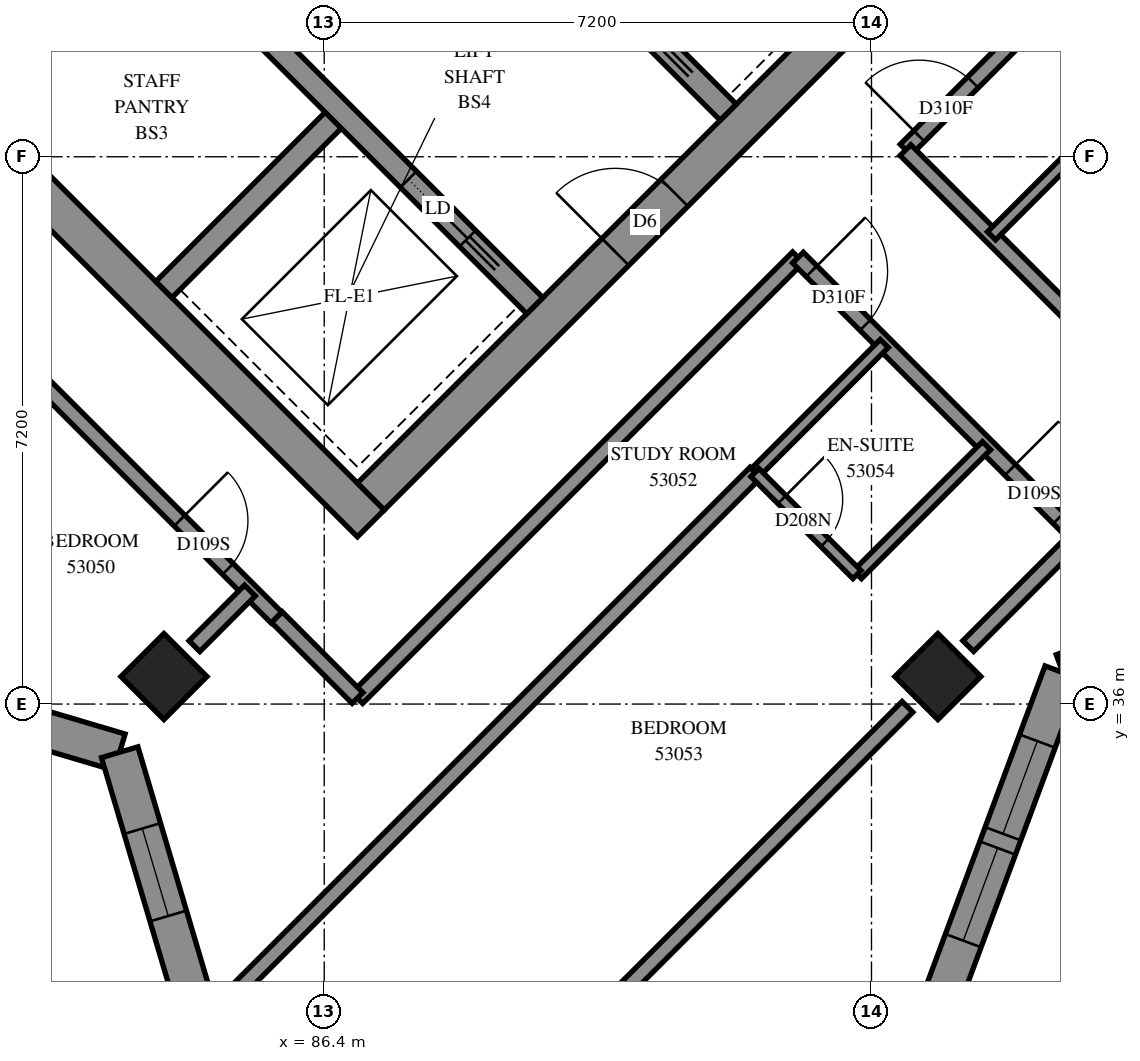
"""IFC4 building model, lengths in metres.
Left out: names, types, materials, properties, quantities, classifications, styles, units other than length and angle.
Written with IfcOpenShell. Run it as: python <this file> out.ifc"""

import sys

from ifc_helpers import new_model, si_unit, direction, frame, frame_2d, origin, origin_2d, place, context, subcontext, project, spatial, polyline, rectangle, outline, extrude, element, fill, save


model = new_model("IFC4")
c1 = context("Model", 3, precision=1e-05, world=origin(), true_north=direction((0.0, 1.0)))
c2 = subcontext(c1, "Body", "Model", "MODEL_VIEW")
j1 = project(units=[si_unit("LENGTHUNIT", "METRE"), si_unit("PLANEANGLEUNIT", "RADIAN")], contexts=[c1])
p1 = place(None, origin())
s1 = spatial("IfcSite", under=j1, at=p1, CompositionType="ELEMENT")
p2 = place(p1, origin())
s2 = spatial("IfcBuilding", under=s1, at=p2, CompositionType="ELEMENT")
p3 = place(p2, frame((0.0, 0.0, 196.4)))
s3 = spatial("IfcBuildingStorey", under=s2, at=p3, CompositionType="ELEMENT", Elevation=196.4)
for number, where, z_axis, x_axis in (
    (1, (84.291, 36.362, 0.0), (0.0, 0.0, 1.0), (0.707, -0.707, 0.0)),
    (2, (94.474, 36.362, 0.0), (0.0, 0.0, 1.0), (0.707, -0.707, 0.0)),
):
    element("IfcColumn", number, at=place(p3, frame(where, z_axis=z_axis, x_axis=x_axis)), inside=s3, PredefinedType="COLUMN", context=c2, shape_type="SweptSolid", body=[
        extrude(rectangle(XDim=0.8, YDim=0.8, at=origin_2d()), origin(), (0.0, 0.0, 1.0), 3.1),
    ])
p4 = place(p3, frame((76.124, 49.267, -0.3), z_axis=(0.0, 0.0, 1.0), x_axis=(0.7071067812, -0.7071067812, 0.0)))
e3 = element("IfcWall", 3, at=p4, inside=s3, PredefinedType="SHEAR", context=c2, shape_type="SweptSolid", body=[
    extrude(rectangle(XDim=15.4, YDim=0.5, at=frame_2d((7.7, 0.0))), origin(), (0.0, 0.0, 1.0), 2.7),
])
p5 = place(p3, frame((87.013, 38.731, -0.3), z_axis=(0.0, 0.0, 1.0), x_axis=(0.7071067812, 0.7071067812, 0.0)))
e4 = element("IfcWall", 4, at=p5, inside=s3, PredefinedType="SHEAR", context=c2, shape_type="SweptSolid", body=[
    extrude(rectangle(XDim=14.4, YDim=0.5, at=frame_2d((7.2, 0.0))), origin(), (0.0, 0.0, 1.0), 2.7),
])
p6 = place(p5, frame((4.55, 0.0, 0.3)))
e5 = element("IfcOpeningElement", 5, at=p6, cuts=e4, PredefinedType="OPENING", context=c2, shape_type="SweptSolid", body=[
    extrude(rectangle(XDim=1.1, YDim=2.1, at=frame_2d((0.55, 1.05))), frame((0.0, 0.26, 0.0), z_axis=(0.0, -1.0, 0.0), x_axis=(1.0, 0.0, 0.0)), (0.0, 0.0, 1.0), 0.52),
])
p7 = place(p5, frame((11.35, 0.0, 0.3)))
e6 = element("IfcOpeningElement", 6, at=p7, cuts=e4, PredefinedType="OPENING", context=c2, shape_type="SweptSolid", body=[
    extrude(rectangle(XDim=1.1, YDim=2.1, at=frame_2d((0.55, 1.05))), frame((0.0, 0.26, 0.0), z_axis=(0.0, -1.0, 0.0), x_axis=(1.0, 0.0, 0.0)), (0.0, 0.0, 1.0), 0.52),
])
for number, where, z_axis, x_axis in (
    (7, (81.746, 43.999, 0.0), (0.0, 0.0, 1.0), (0.707, 0.707, 0.0)),
    (8, (84.291, 41.453, 0.0), (0.0, 0.0, 1.0), (0.707, 0.707, 0.0)),
):
    element("IfcWall", number, at=place(p3, frame(where, z_axis=z_axis, x_axis=x_axis)), inside=s3, PredefinedType="SOLIDWALL", context=c2, shape_type="SweptSolid", body=[
        extrude(rectangle(XDim=3.3, YDim=0.3, at=frame_2d((1.65, 0.0))), origin(), (0.0, 0.0, 1.0), 3.1),
    ])
p8 = place(p3, frame((78.988, 51.423, 0.0), z_axis=(0.0, 0.0, 1.0), x_axis=(0.7071067812, -0.7071067812, 0.0)))
e9 = element("IfcWall", 9, at=p8, inside=s3, PredefinedType="SOLIDWALL", context=c2, shape_type="SweptSolid", body=[
    extrude(rectangle(XDim=14.4, YDim=0.3, at=frame_2d((7.2, 0.0))), origin(), (0.0, 0.0, 1.0), 3.1),
])
p9 = place(p8, frame((1.35, 0.0, 0.0)))
e10 = element("IfcOpeningElement", 10, at=p9, cuts=e9, PredefinedType="OPENING", context=c2, shape_type="SweptSolid", body=[
    extrude(rectangle(XDim=0.9, YDim=2.1, at=frame_2d((0.45, 1.05))), frame((0.0, 0.16, 0.0), z_axis=(0.0, -1.0, 0.0), x_axis=(1.0, 0.0, 0.0)), (0.0, 0.0, 1.0), 0.32),
])
p10 = place(p8, frame((4.95, 0.0, 0.0)))
e11 = element("IfcOpeningElement", 11, at=p10, cuts=e9, PredefinedType="OPENING", context=c2, shape_type="SweptSolid", body=[
    extrude(rectangle(XDim=0.9, YDim=2.1, at=frame_2d((0.45, 1.05))), frame((0.0, 0.16, 0.0), z_axis=(0.0, -1.0, 0.0), x_axis=(1.0, 0.0, 0.0)), (0.0, 0.0, 1.0), 0.32),
])
p11 = place(p8, frame((8.55, 0.0, 0.0)))
e12 = element("IfcOpeningElement", 12, at=p11, cuts=e9, PredefinedType="OPENING", context=c2, shape_type="SweptSolid", body=[
    extrude(rectangle(XDim=0.9, YDim=2.1, at=frame_2d((0.45, 1.05))), frame((0.0, 0.16, 0.0), z_axis=(0.0, -1.0, 0.0), x_axis=(1.0, 0.0, 0.0)), (0.0, 0.0, 1.0), 0.32),
])
p12 = place(p8, frame((12.05, 0.0, 0.0)))
e13 = element("IfcOpeningElement", 13, at=p12, cuts=e9, PredefinedType="OPENING", context=c2, shape_type="SweptSolid", body=[
    extrude(rectangle(XDim=1.1, YDim=2.1, at=frame_2d((0.55, 1.05))), frame((0.0, 0.16, 0.0), z_axis=(0.0, -1.0, 0.0), x_axis=(1.0, 0.0, 0.0)), (0.0, 0.0, 1.0), 0.32),
])
p13 = place(p3, frame((81.534, 53.969, 0.0), z_axis=(0.0, 0.0, 1.0), x_axis=(0.707103309, -0.7071102534, 0.0)))
e14 = element("IfcWall", 14, at=p13, inside=s3, PredefinedType="SOLIDWALL", context=c2, shape_type="SweptSolid", body=[
    extrude(rectangle(XDim=14.4, YDim=0.3, at=frame_2d((7.2, 0.0))), origin(), (0.0, 0.0, 1.0), 3.1),
])
p14 = place(p13, frame((1.25, 0.0, 0.0)))
e15 = element("IfcOpeningElement", 15, at=p14, cuts=e14, PredefinedType="OPENING", context=c2, shape_type="SweptSolid", body=[
    extrude(rectangle(XDim=1.1, YDim=2.1, at=frame_2d((0.55, 1.05))), frame((0.0, 0.16, 0.0), z_axis=(0.0, -1.0, 0.0), x_axis=(1.0, 0.0, 0.0)), (0.0, 0.0, 1.0), 0.32),
])
p15 = place(p13, frame((4.85, 0.0, 0.0)))
e16 = element("IfcOpeningElement", 16, at=p15, cuts=e14, PredefinedType="OPENING", context=c2, shape_type="SweptSolid", body=[
    extrude(rectangle(XDim=1.1, YDim=2.1, at=frame_2d((0.55, 1.05))), frame((0.0, 0.16, 0.0), z_axis=(0.0, -1.0, 0.0), x_axis=(1.0, 0.0, 0.0)), (0.0, 0.0, 1.0), 0.32),
])
p16 = place(p13, frame((8.45, 0.0, 0.0)))
e17 = element("IfcOpeningElement", 17, at=p16, cuts=e14, PredefinedType="OPENING", context=c2, shape_type="SweptSolid", body=[
    extrude(rectangle(XDim=1.1, YDim=2.1, at=frame_2d((0.55, 1.05))), frame((0.0, 0.16, 0.0), z_axis=(0.0, -1.0, 0.0), x_axis=(1.0, 0.0, 0.0)), (0.0, 0.0, 1.0), 0.32),
])
p17 = place(p13, frame((12.05, 0.0, 0.0)))
e18 = element("IfcOpeningElement", 18, at=p17, cuts=e14, PredefinedType="OPENING", context=c2, shape_type="SweptSolid", body=[
    extrude(rectangle(XDim=1.1, YDim=2.1, at=frame_2d((0.55, 1.05))), frame((0.0, 0.16, 0.0), z_axis=(0.0, -1.0, 0.0), x_axis=(1.0, 0.0, 0.0)), (0.0, 0.0, 1.0), 0.32),
])
p18 = place(p3, frame((94.281, 31.47, 0.0), z_axis=(0.0, 0.0, 1.0), x_axis=(0.3481903374, 0.9374238577, 0.0)))
e19 = element("IfcWall", 19, at=p18, inside=s3, PredefinedType="SOLIDWALL", context=c2, shape_type="SweptSolid", body=[
    extrude(outline(polyline([(-0.12, -0.25), (5.16, -0.25), (5.39, 0.25), (0.12, 0.25), (-0.12, -0.25)])), origin(), (0.0, 0.0, 1.0), 3.1),
])
p19 = place(p18, frame((1.512, 0.0, 0.45)))
e20 = element("IfcOpeningElement", 20, at=p19, cuts=e19, PredefinedType="OPENING", context=c2, shape_type="SweptSolid", body=[
    extrude(rectangle(XDim=1.3, YDim=2.5, at=frame_2d((0.65, 1.25))), frame((0.0, 0.26, 0.0), z_axis=(0.0, -1.0, 0.0), x_axis=(1.0, 0.0, 0.0)), (0.0, 0.0, 1.0), 0.52),
])
p20 = place(p18, frame((3.012, 0.0, 0.45)))
e21 = element("IfcOpeningElement", 21, at=p20, cuts=e19, PredefinedType="OPENING", context=c2, shape_type="SweptSolid", body=[
    extrude(rectangle(XDim=1.3, YDim=2.5, at=frame_2d((0.65, 1.25))), frame((0.0, 0.26, 0.0), z_axis=(0.0, -1.0, 0.0), x_axis=(1.0, 0.0, 0.0)), (0.0, 0.0, 1.0), 0.52),
])
p21 = place(p3, frame((96.118, 36.415, 0.0), z_axis=(0.0, 0.0, 1.0), x_axis=(0.9374238577, 0.3481903374, 0.0)))
e22 = element("IfcWall", 22, at=p21, inside=s3, PredefinedType="SOLIDWALL", context=c2, shape_type="SweptSolid", body=[
    extrude(outline(polyline([(0.115, -0.25), (5.395, -0.25), (5.155, 0.25), (-0.115, 0.25), (0.115, -0.25)])), origin(), (0.0, 0.0, 1.0), 3.1),
])
p22 = place(p21, frame((1.655, 0.0, 0.45)))
e23 = element("IfcOpeningElement", 23, at=p22, cuts=e22, PredefinedType="OPENING", context=c2, shape_type="SweptSolid", body=[
    extrude(rectangle(XDim=1.3, YDim=2.5, at=frame_2d((0.65, 1.25))), frame((0.0, 0.26, 0.0), z_axis=(0.0, -1.0, 0.0), x_axis=(1.0, 0.0, 0.0)), (0.0, 0.0, 1.0), 0.52),
])
p23 = place(p21, frame((3.155, 0.0, 0.45)))
e24 = element("IfcOpeningElement", 24, at=p23, cuts=e22, PredefinedType="OPENING", context=c2, shape_type="SweptSolid", body=[
    extrude(rectangle(XDim=1.3, YDim=2.5, at=frame_2d((0.65, 1.25))), frame((0.0, 0.26, 0.0), z_axis=(0.0, -1.0, 0.0), x_axis=(1.0, 0.0, 0.0)), (0.0, 0.0, 1.0), 0.52),
])
p24 = place(p3, frame((79.293, 36.675, 0.0), z_axis=(0.0, 0.0, 1.0), x_axis=(0.9587670056, -0.2841932951, 0.0)))
e25 = element("IfcWall", 25, at=p24, inside=s3, PredefinedType="SOLIDWALL", context=c2, shape_type="SweptSolid", body=[
    extrude(outline(polyline([(-0.142, -0.25), (4.47, -0.25), (4.742, 0.25), (0.142, 0.25), (-0.142, -0.25)])), origin(), (0.0, 0.0, 1.0), 3.1),
])
p25 = place(p24, frame((0.6, 0.0, 0.45)))
e26 = element("IfcOpeningElement", 26, at=p25, cuts=e25, PredefinedType="OPENING", context=c2, shape_type="SweptSolid", body=[
    extrude(rectangle(XDim=1.3, YDim=2.5, at=frame_2d((0.65, 1.25))), frame((0.0, 0.26, 0.0), z_axis=(0.0, -1.0, 0.0), x_axis=(1.0, 0.0, 0.0)), (0.0, 0.0, 1.0), 0.52),
])
p26 = place(p24, frame((2.3, 0.0, 0.45)))
e27 = element("IfcOpeningElement", 27, at=p26, cuts=e25, PredefinedType="OPENING", context=c2, shape_type="SweptSolid", body=[
    extrude(rectangle(XDim=1.3, YDim=2.5, at=frame_2d((0.65, 1.25))), frame((0.0, 0.26, 0.0), z_axis=(0.0, -1.0, 0.0), x_axis=(1.0, 0.0, 0.0)), (0.0, 0.0, 1.0), 0.52),
])
p27 = place(p3, frame((83.709, 35.366, 0.0), z_axis=(0.0, 0.0, 1.0), x_axis=(0.2841932951, -0.9587670056, 0.0)))
e28 = element("IfcWall", 28, at=p27, inside=s3, PredefinedType="SOLIDWALL", context=c2, shape_type="SweptSolid", body=[
    extrude(outline(polyline([(0.136, -0.25), (4.748, -0.25), (4.464, 0.25), (-0.136, 0.25), (0.136, -0.25)])), origin(), (0.0, 0.0, 1.0), 3.1),
])
p28 = place(p27, frame((1.047, 0.0, 0.45)))
e29 = element("IfcOpeningElement", 29, at=p28, cuts=e28, PredefinedType="OPENING", context=c2, shape_type="SweptSolid", body=[
    extrude(rectangle(XDim=1.2, YDim=2.5, at=frame_2d((0.6, 1.25))), frame((0.0, 0.26, 0.0), z_axis=(0.0, -1.0, 0.0), x_axis=(1.0, 0.0, 0.0)), (0.0, 0.0, 1.0), 0.52),
])
p29 = place(p3, frame((84.981, 31.956, 0.0), z_axis=(0.0, 0.0, 1.0), x_axis=(0.7072314232, 0.7069821172, 0.0)))
e30 = element("IfcWall", 30, at=p29, inside=s3, PredefinedType="PARTITIONING", context=c2, shape_type="SweptSolid", body=[
    extrude(rectangle(XDim=10.028, YDim=0.2, at=frame_2d((5.014, 0.0))), origin(), (0.0, 0.0, 1.0), 3.1),
])
p30 = place(p3, frame((94.049, 43.293, 0.0), z_axis=(0.0, 0.0, 1.0), x_axis=(0.7071067812, 0.7071067812, 0.0)))
e31 = element("IfcWall", 31, at=p30, inside=s3, PredefinedType="PARTITIONING", context=c2, shape_type="SweptSolid", body=[
    extrude(rectangle(XDim=8.2, YDim=0.2, at=frame_2d((4.1, 0.0))), origin(), (0.0, 0.0, 1.0), 3.1),
])
p31 = place(p30, frame((0.252, 0.0, 0.0)))
e32 = element("IfcOpeningElement", 32, at=p31, cuts=e31, PredefinedType="OPENING", context=c2, shape_type="SweptSolid", body=[
    extrude(rectangle(XDim=1.0, YDim=2.1, at=frame_2d((0.5, 1.05))), frame((0.0, 0.11, 0.0), z_axis=(0.0, -1.0, 0.0), x_axis=(1.0, 0.0, 0.0)), (0.0, 0.0, 1.0), 0.22),
])
p32 = place(p3, frame((86.835, 36.079, 0.0), z_axis=(0.0, 0.0, 1.0), x_axis=(0.7071067812, 0.7071067812, 0.0)))
e33 = element("IfcWall", 33, at=p32, inside=s3, PredefinedType="PARTITIONING", context=c2, shape_type="SweptSolid", body=[
    extrude(rectangle(XDim=8.2, YDim=0.2, at=frame_2d((4.1, 0.0))), origin(), (0.0, 0.0, 1.0), 3.1),
])
p33 = place(p3, frame((80.849, 42.061, 0.0), z_axis=(0.0, 0.0, 1.0), x_axis=(0.7071067812, -0.7071067812, 0.0)))
e34 = element("IfcWall", 34, at=p33, inside=s3, PredefinedType="PARTITIONING", context=c2, shape_type="SweptSolid", body=[
    extrude(rectangle(XDim=6.964, YDim=0.2, at=frame_2d((3.482, 0.0))), origin(), (0.0, 0.0, 1.0), 3.1),
])
p34 = place(p33, frame((5.159, 0.0, 0.0)))
e35 = element("IfcOpeningElement", 35, at=p34, cuts=e34, PredefinedType="OPENING", context=c2, shape_type="SweptSolid", body=[
    extrude(rectangle(XDim=0.9, YDim=2.1, at=frame_2d((0.45, 1.05))), frame((0.0, 0.11, 0.0), z_axis=(0.0, -1.0, 0.0), x_axis=(1.0, 0.0, 0.0)), (0.0, 0.0, 1.0), 0.22),
])
p35 = place(p3, frame((89.781, 31.671, 0.0), z_axis=(0.0, 0.0, 1.0), x_axis=(0.7071067812, 0.7071067812, 0.0)))
e36 = element("IfcWall", 36, at=p35, inside=s3, PredefinedType="PARTITIONING", context=c2, shape_type="SweptSolid", body=[
    extrude(rectangle(XDim=6.07, YDim=0.2, at=frame_2d((3.035, 0.0))), origin(), (0.0, 0.0, 1.0), 2.6),
])
p36 = place(p3, frame((94.047, 43.287, 0.0), z_axis=(0.0, 0.0, 1.0), x_axis=(0.7071067812, -0.7071067812, 0.0)))
e37 = element("IfcWall", 37, at=p36, inside=s3, PredefinedType="PARTITIONING", context=c2, shape_type="SweptSolid", body=[
    extrude(rectangle(XDim=5.199, YDim=0.2, at=frame_2d((2.599, 0.0))), origin(), (0.0, 0.0, 1.0), 3.1),
])
p37 = place(p36, frame((3.898, 0.0, 0.0)))
e38 = element("IfcOpeningElement", 38, at=p37, cuts=e37, PredefinedType="OPENING", context=c2, shape_type="SweptSolid", body=[
    extrude(rectangle(XDim=0.9, YDim=2.1, at=frame_2d((0.45, 1.05))), frame((0.0, 0.11, 0.0), z_axis=(0.0, -1.0, 0.0), x_axis=(1.0, 0.0, 0.0)), (0.0, 0.0, 1.0), 0.22),
])
p38 = place(p3, frame((92.633, 41.873, 0.0), z_axis=(0.0, 0.0, 1.0), x_axis=(0.7071067812, -0.7071067812, 0.0)))
e39 = element("IfcWall", 39, at=p38, inside=s3, PredefinedType="PARTITIONING", context=c2, shape_type="SweptSolid", body=[
    extrude(rectangle(XDim=5.199, YDim=0.2, at=frame_2d((2.599, 0.0))), origin(), (0.0, 0.0, 1.0), 3.1),
])
p39 = place(p38, frame((0.253, 0.0, 0.0)))
e40 = element("IfcOpeningElement", 40, at=p39, cuts=e39, PredefinedType="OPENING", context=c2, shape_type="SweptSolid", body=[
    extrude(rectangle(XDim=1.0, YDim=2.1, at=frame_2d((0.5, 1.05))), frame((0.0, 0.11, 0.0), z_axis=(0.0, -1.0, 0.0), x_axis=(1.0, 0.0, 0.0)), (0.0, 0.0, 1.0), 0.22),
])
p40 = place(p38, frame((3.948, 0.0, 0.0)))
e41 = element("IfcOpeningElement", 41, at=p40, cuts=e39, PredefinedType="OPENING", context=c2, shape_type="SweptSolid", body=[
    extrude(rectangle(XDim=0.9, YDim=2.1, at=frame_2d((0.45, 1.05))), frame((0.0, 0.11, 0.0), z_axis=(0.0, -1.0, 0.0), x_axis=(1.0, 0.0, 0.0)), (0.0, 0.0, 1.0), 0.22),
])
p41 = place(p3, frame((95.179, 42.161, 0.0), z_axis=(0.0, 0.0, 1.0), x_axis=(0.7071067812, 0.7071067812, 0.0)))
e42 = element("IfcWall", 42, at=p41, inside=s3, PredefinedType="PARTITIONING", context=c2, shape_type="SweptSolid", body=[
    extrude(rectangle(XDim=2.401, YDim=0.15, at=frame_2d((1.201, 0.0))), origin(), (0.0, 0.0, 1.0), 3.1),
])
for number, where, z_axis, x_axis in (
    (43, (92.072, 39.046, 0.0), (0.0, 0.0, 1.0), (0.707, 0.708, 0.0)),
    (44, (93.415, 37.703, 0.0), (0.0, 0.0, 1.0), (0.708, 0.707, 0.0)),
):
    element("IfcWall", number, at=place(p3, frame(where, z_axis=z_axis, x_axis=x_axis)), inside=s3, PredefinedType="PARTITIONING", context=c2, shape_type="SweptSolid", body=[
        extrude(rectangle(XDim=2.4, YDim=0.15, at=frame_2d((1.2, 0.0))), origin(), (0.0, 0.0, 1.0), 3.1),
    ])
p42 = place(p3, frame((94.873, 36.763, 0.0), z_axis=(0.0, 0.0, 1.0), x_axis=(0.7071067812, 0.7071067812, 0.0)))
e45 = element("IfcWall", 45, at=p42, inside=s3, PredefinedType="PARTITIONING", context=c2, shape_type="SweptSolid", body=[
    extrude(rectangle(XDim=2.034, YDim=0.2, at=frame_2d((1.017, 0.0))), origin(), (0.0, 0.0, 1.0), 2.6),
])
p43 = place(p3, frame((92.067, 39.045, 0.0), z_axis=(0.0, 0.0, 1.0), x_axis=(0.7071067812, -0.7071067812, 0.0)))
e46 = element("IfcWall", 46, at=p43, inside=s3, PredefinedType="PARTITIONING", context=c2, shape_type="SweptSolid", body=[
    extrude(rectangle(XDim=1.898, YDim=0.15, at=frame_2d((0.949, 0.0))), origin(), (0.0, 0.0, 1.0), 3.1),
])
p44 = place(p43, frame((0.501, 0.0, 0.0)))
e47 = element("IfcOpeningElement", 47, at=p44, cuts=e46, PredefinedType="OPENING", context=c2, shape_type="SweptSolid", body=[
    extrude(rectangle(XDim=0.8, YDim=2.1, at=frame_2d((0.4, 1.05))), frame((0.0, 0.085, 0.0), z_axis=(0.0, -1.0, 0.0), x_axis=(1.0, 0.0, 0.0)), (0.0, 0.0, 1.0), 0.17),
])
p45 = place(p3, frame((85.778, 37.142, 0.0), z_axis=(0.0, 0.0, 1.0), x_axis=(0.7064400143, -0.70777292, 0.0)))
e48 = element("IfcWall", 48, at=p45, inside=s3, PredefinedType="PARTITIONING", context=c2, shape_type="SweptSolid", body=[
    extrude(rectangle(XDim=1.5, YDim=0.2, at=frame_2d((0.75, 0.0))), origin(), (0.0, 0.0, 1.0), 3.1),
])
p46 = place(p3, frame((84.693, 36.761, 0.0), z_axis=(0.0, 0.0, 1.0), x_axis=(0.7061388061, 0.708073433, 0.0)))
e49 = element("IfcWall", 49, at=p46, inside=s3, PredefinedType="PARTITIONING", context=c2, shape_type="SweptSolid", body=[
    extrude(rectangle(XDim=1.034, YDim=0.2, at=frame_2d((0.517, 0.0))), origin(), (0.0, 0.0, 1.0), 3.1),
])
p47 = place(p19, origin())
e50 = element("IfcWindow", 50, at=p47, inside=s3, PartitioningType="SINGLE_PANEL", PredefinedType="WINDOW", context=c2, shape_type="SweptSolid", body=[
    extrude(rectangle(XDim=1.3, YDim=2.5, at=frame_2d((0.65, 1.25))), frame((0.0, 0.18, 0.0), z_axis=(0.0, -1.0, 0.0), x_axis=(1.0, 0.0, 0.0)), (0.0, 0.0, 1.0), 0.06),
])
fill(e20, e50)
p48 = place(p20, origin())
e51 = element("IfcWindow", 51, at=p48, inside=s3, PartitioningType="SINGLE_PANEL", PredefinedType="WINDOW", context=c2, shape_type="SweptSolid", body=[
    extrude(rectangle(XDim=1.3, YDim=2.5, at=frame_2d((0.65, 1.25))), frame((0.0, 0.18, 0.0), z_axis=(0.0, -1.0, 0.0), x_axis=(1.0, 0.0, 0.0)), (0.0, 0.0, 1.0), 0.06),
])
fill(e21, e51)
p49 = place(p28, origin())
e52 = element("IfcWindow", 52, at=p49, inside=s3, PartitioningType="SINGLE_PANEL", PredefinedType="WINDOW", context=c2, shape_type="SweptSolid", body=[
    extrude(rectangle(XDim=1.2, YDim=2.5, at=frame_2d((0.6, 1.25))), frame((0.0, 0.18, 0.0), z_axis=(0.0, -1.0, 0.0), x_axis=(1.0, 0.0, 0.0)), (0.0, 0.0, 1.0), 0.06),
])
fill(e29, e52)
p50 = place(p6, origin())
e53 = element("IfcDoor", 53, at=p50, inside=s3, OperationType="DOUBLE_DOOR_SINGLE_SWING", PredefinedType="DOOR", context=c2, shape_type="SweptSolid", body=[
    extrude(rectangle(XDim=1.1, YDim=2.1, at=frame_2d((0.55, 1.05))), frame((0.0, 0.025, 0.0), z_axis=(0.0, -1.0, 0.0), x_axis=(1.0, 0.0, 0.0)), (0.0, 0.0, 1.0), 0.05),
])
fill(e5, e53)
p51 = place(p12, origin())
e54 = element("IfcDoor", 54, at=p51, inside=s3, OperationType="SLIDING_TO_RIGHT", PredefinedType="DOOR", context=c2, shape_type="SweptSolid", body=[
    extrude(rectangle(XDim=1.1, YDim=2.1, at=frame_2d((0.55, 1.05))), frame((0.0, 0.025, 0.0), z_axis=(0.0, -1.0, 0.0), x_axis=(1.0, 0.0, 0.0)), (0.0, 0.0, 1.0), 0.05),
])
fill(e13, e54)
p52 = place(p31, origin())
e55 = element("IfcDoor", 55, at=p52, inside=s3, OperationType="SINGLE_SWING_RIGHT", PredefinedType="DOOR", context=c2, shape_type="SweptSolid", body=[
    extrude(rectangle(XDim=1.0, YDim=2.1, at=frame_2d((0.5, 1.05))), frame((0.0, 0.025, 0.0), z_axis=(0.0, -1.0, 0.0), x_axis=(1.0, 0.0, 0.0)), (0.0, 0.0, 1.0), 0.05),
])
fill(e32, e55)
p53 = place(p34, origin())
e56 = element("IfcDoor", 56, at=p53, inside=s3, OperationType="SINGLE_SWING_RIGHT", PredefinedType="DOOR", context=c2, shape_type="SweptSolid", body=[
    extrude(rectangle(XDim=0.9, YDim=2.1, at=frame_2d((0.45, 1.05))), frame((0.0, 0.025, 0.0), z_axis=(0.0, -1.0, 0.0), x_axis=(1.0, 0.0, 0.0)), (0.0, 0.0, 1.0), 0.05),
])
fill(e35, e56)
p54 = place(p39, origin())
e57 = element("IfcDoor", 57, at=p54, inside=s3, OperationType="SINGLE_SWING_RIGHT", PredefinedType="DOOR", context=c2, shape_type="SweptSolid", body=[
    extrude(rectangle(XDim=1.0, YDim=2.1, at=frame_2d((0.5, 1.05))), frame((0.0, 0.025, 0.0), z_axis=(0.0, -1.0, 0.0), x_axis=(1.0, 0.0, 0.0)), (0.0, 0.0, 1.0), 0.05),
])
fill(e40, e57)
p55 = place(p40, origin())
e58 = element("IfcDoor", 58, at=p55, inside=s3, OperationType="SINGLE_SWING_LEFT", PredefinedType="DOOR", context=c2, shape_type="SweptSolid", body=[
    extrude(rectangle(XDim=0.9, YDim=2.1, at=frame_2d((0.45, 1.05))), frame((0.0, 0.025, 0.0), z_axis=(0.0, -1.0, 0.0), x_axis=(1.0, 0.0, 0.0)), (0.0, 0.0, 1.0), 0.05),
])
fill(e41, e58)
p56 = place(p44, origin())
e59 = element("IfcDoor", 59, at=p56, inside=s3, OperationType="SINGLE_SWING_RIGHT", PredefinedType="DOOR", context=c2, shape_type="SweptSolid", body=[
    extrude(rectangle(XDim=0.8, YDim=2.1, at=frame_2d((0.4, 1.05))), frame((0.0, 0.025, 0.0), z_axis=(0.0, -1.0, 0.0), x_axis=(1.0, 0.0, 0.0)), (0.0, 0.0, 1.0), 0.05),
])
fill(e47, e59)
save(model, sys.argv[1])
